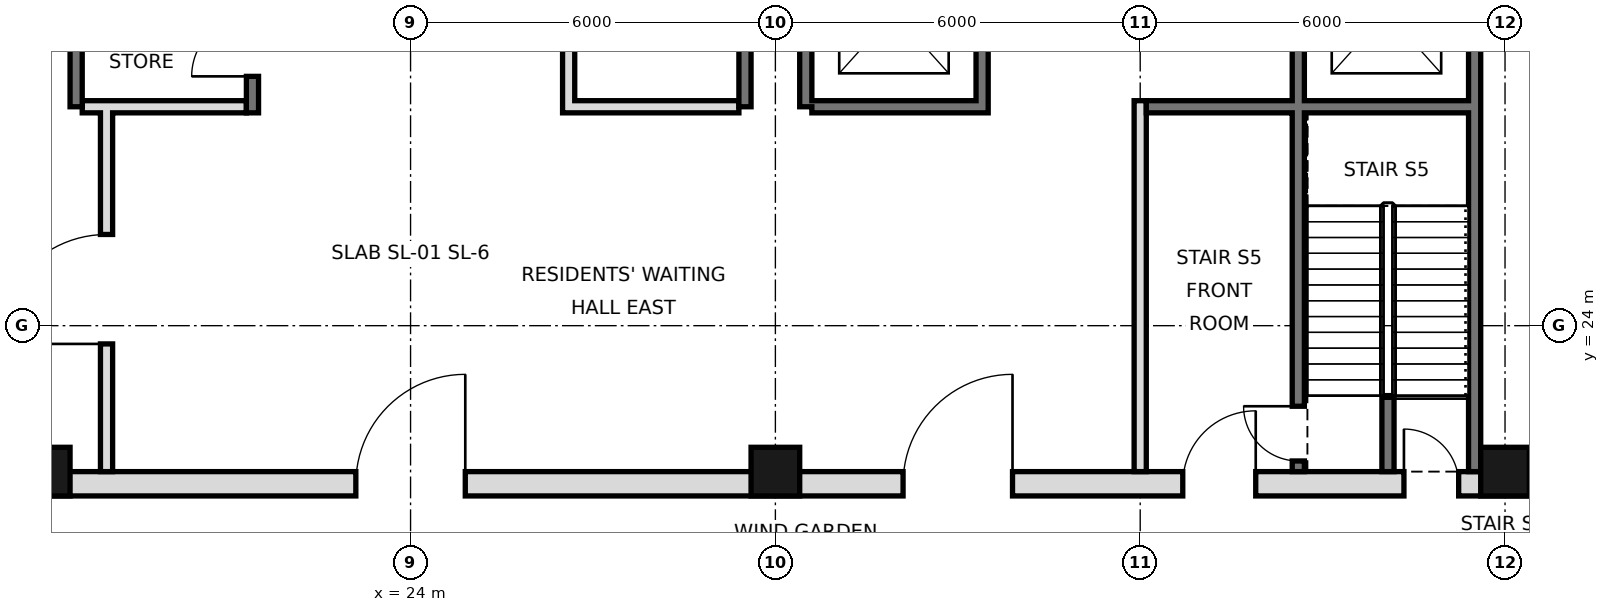
"""IFC4 building model, lengths in metres.
Left out: names, types, materials, properties, quantities, classifications, styles, units other than length and angle.
Written with IfcOpenShell. Run it as: python <this file> out.ifc"""

import sys

from ifc_helpers import new_model, si_unit, direction, frame, frame_2d, origin, origin_2d, place, context, subcontext, project, spatial, rectangle, hollow_rectangle, extrude, element, fill, save


model = new_model("IFC4")
c1 = context("Model", 3, precision=1e-05, world=origin(), true_north=direction((0.0, 1.0)))
c2 = subcontext(c1, "Body", "Model", "MODEL_VIEW")
j1 = project(units=[si_unit("LENGTHUNIT", "METRE"), si_unit("PLANEANGLEUNIT", "RADIAN")], contexts=[c1])
p1 = place(None, origin())
s1 = spatial("IfcSite", under=j1, at=p1, CompositionType="ELEMENT")
p2 = place(p1, origin())
s2 = spatial("IfcBuilding", under=s1, at=p2, CompositionType="ELEMENT")
p3 = place(p2, frame((0.0, 0.0, 281.8)))
s3 = spatial("IfcBuildingStorey", under=s2, at=p3, CompositionType="ELEMENT", Elevation=281.8)
for number, where, z_axis, x_axis in (
    (1, (18.0, 21.6, 0.0), (0.0, 0.0, 1.0), (1.0, 0.0, 0.0)),
    (2, (30.0, 21.6, 0.0), (0.0, 0.0, 1.0), (1.0, 0.0, 0.0)),
    (3, (42.0, 21.6, 0.0), (0.0, 0.0, 1.0), (1.0, 0.0, 0.0)),
):
    element("IfcColumn", number, at=place(p3, frame(where, z_axis=z_axis, x_axis=x_axis)), inside=s3, PredefinedType="COLUMN", context=c2, shape_type="SweptSolid", body=[
        extrude(hollow_rectangle(XDim=0.8, YDim=0.8, WallThickness=0.032, at=origin_2d()), origin(), (0.0, 0.0, 1.0), 9.0),
    ])
p4 = place(p3, frame((41.5, 21.6, 0.0), z_axis=(0.0, 0.0, 1.0), x_axis=(0.0, 1.0, 0.0)))
e4 = element("IfcWall", 4, at=p4, inside=s3, PredefinedType="SOLIDWALL", context=c2, shape_type="SweptSolid", body=[
    extrude(rectangle(XDim=23.5, YDim=0.2, at=frame_2d((11.75, 0.0))), origin(), (0.0, 0.0, 1.0), 8.7),
])
for number, where, z_axis, x_axis in (
    (5, (18.5, 27.6, 0.0), (0.0, 0.0, 1.0), (0.0, 1.0, 0.0)),
    (6, (29.5, 27.6, 0.0), (0.0, 0.0, 1.0), (0.0, 1.0, 0.0)),
    (7, (30.5, 27.6, 0.0), (0.0, 0.0, 1.0), (0.0, 1.0, 0.0)),
):
    element("IfcWall", number, at=place(p3, frame(where, z_axis=z_axis, x_axis=x_axis)), inside=s3, PredefinedType="SOLIDWALL", context=c2, shape_type="SweptSolid", body=[
        extrude(rectangle(XDim=17.5, YDim=0.2, at=frame_2d((8.75, 0.0))), origin(), (0.0, 0.0, 1.0), 8.7),
    ])
p5 = place(p3, frame((5.6, 21.4, 0.0), z_axis=(0.0, 0.0, 1.0), x_axis=(1.0, 0.0, 0.0)))
e8 = element("IfcWall", 8, at=p5, inside=s3, PredefinedType="SOLIDWALL", context=c2, shape_type="SweptSolid", body=[
    extrude(rectangle(XDim=36.8, YDim=0.4, at=frame_2d((18.4, 0.0))), origin(), (0.0, 0.0, 1.0), 8.7),
])
p6 = place(p5, frame((8.5, 0.0, 0.0)))
e9 = element("IfcOpeningElement", 9, at=p6, cuts=e8, PredefinedType="OPENING", context=c2, shape_type="SweptSolid", body=[
    extrude(rectangle(XDim=1.8, YDim=2.1, at=frame_2d((0.9, 1.05))), frame((0.0, 0.21, 0.0), z_axis=(0.0, -1.0, 0.0), x_axis=(1.0, 0.0, 0.0)), (0.0, 0.0, 1.0), 0.42),
])
p7 = place(p5, frame((17.5, 0.0, 0.0)))
e10 = element("IfcOpeningElement", 10, at=p7, cuts=e8, PredefinedType="OPENING", context=c2, shape_type="SweptSolid", body=[
    extrude(rectangle(XDim=1.8, YDim=2.1, at=frame_2d((0.9, 1.05))), frame((0.0, 0.21, 0.0), z_axis=(0.0, -1.0, 0.0), x_axis=(1.0, 0.0, 0.0)), (0.0, 0.0, 1.0), 0.42),
])
p8 = place(p5, frame((26.5, 0.0, 0.0)))
e11 = element("IfcOpeningElement", 11, at=p8, cuts=e8, PredefinedType="OPENING", context=c2, shape_type="SweptSolid", body=[
    extrude(rectangle(XDim=1.8, YDim=2.1, at=frame_2d((0.9, 1.05))), frame((0.0, 0.21, 0.0), z_axis=(0.0, -1.0, 0.0), x_axis=(1.0, 0.0, 0.0)), (0.0, 0.0, 1.0), 0.42),
])
p9 = place(p5, frame((4.5, 0.0, 0.0)))
e12 = element("IfcOpeningElement", 12, at=p9, cuts=e8, PredefinedType="OPENING", context=c2, shape_type="SweptSolid", body=[
    extrude(rectangle(XDim=1.2, YDim=2.1, at=frame_2d((0.6, 1.05))), frame((0.0, 0.21, 0.0), z_axis=(0.0, -1.0, 0.0), x_axis=(1.0, 0.0, 0.0)), (0.0, 0.0, 1.0), 0.42),
])
p10 = place(p5, frame((31.1, 0.0, 0.0)))
e13 = element("IfcOpeningElement", 13, at=p10, cuts=e8, PredefinedType="OPENING", context=c2, shape_type="SweptSolid", body=[
    extrude(rectangle(XDim=1.2, YDim=2.1, at=frame_2d((0.6, 1.05))), frame((0.0, 0.21, 0.0), z_axis=(0.0, -1.0, 0.0), x_axis=(1.0, 0.0, 0.0)), (0.0, 0.0, 1.0), 0.42),
])
p11 = place(p5, frame((1.163, 0.0, 0.0)))
e14 = element("IfcOpeningElement", 14, at=p11, cuts=e8, PredefinedType="OPENING", context=c2, shape_type="SweptSolid", body=[
    extrude(rectangle(XDim=0.9, YDim=2.1, at=frame_2d((0.45, 1.05))), frame((0.0, 0.21, 0.0), z_axis=(0.0, -1.0, 0.0), x_axis=(1.0, 0.0, 0.0)), (0.0, 0.0, 1.0), 0.42),
])
p12 = place(p5, frame((34.738, 0.0, 0.0)))
e15 = element("IfcOpeningElement", 15, at=p12, cuts=e8, PredefinedType="OPENING", context=c2, shape_type="SweptSolid", body=[
    extrude(rectangle(XDim=0.9, YDim=2.1, at=frame_2d((0.45, 1.05))), frame((0.0, 0.21, 0.0), z_axis=(0.0, -1.0, 0.0), x_axis=(1.0, 0.0, 0.0)), (0.0, 0.0, 1.0), 0.42),
])
p13 = place(p3, frame((19.0, 21.6, 0.0), z_axis=(0.0, 0.0, 1.0), x_axis=(0.0, 1.0, 0.0)))
e16 = element("IfcWall", 16, at=p13, inside=s3, PredefinedType="PARTITIONING", context=c2, shape_type="SweptSolid", body=[
    extrude(rectangle(XDim=6.0, YDim=0.2, at=frame_2d((3.0, 0.0))), origin(), (0.0, 0.0, 1.0), 8.7),
])
p14 = place(p13, frame((2.1, 0.0, 0.0)))
e17 = element("IfcOpeningElement", 17, at=p14, cuts=e16, PredefinedType="OPENING", context=c2, shape_type="SweptSolid", body=[
    extrude(rectangle(XDim=1.8, YDim=2.1, at=frame_2d((0.9, 1.05))), frame((0.0, 0.11, 0.0), z_axis=(0.0, -1.0, 0.0), x_axis=(1.0, 0.0, 0.0)), (0.0, 0.0, 1.0), 0.22),
])
p15 = place(p3, frame((21.4, 27.5, 0.0), z_axis=(0.0, 0.0, 1.0), x_axis=(0.0, 1.0, 0.0)))
e18 = element("IfcWall", 18, at=p15, inside=s3, PredefinedType="SOLIDWALL", context=c2, shape_type="SweptSolid", body=[
    extrude(rectangle(XDim=17.5, YDim=0.2, at=frame_2d((8.75, 0.0))), origin(), (0.0, 0.0, 1.0), 8.7),
])
p16 = place(p15, frame((0.6, 0.0, 0.0)))
e19 = element("IfcOpeningElement", 19, at=p16, cuts=e18, PredefinedType="OPENING", context=c2, shape_type="SweptSolid", body=[
    extrude(rectangle(XDim=1.0, YDim=2.1, at=frame_2d((0.5, 1.05))), frame((0.0, 0.11, 0.0), z_axis=(0.0, -1.0, 0.0), x_axis=(1.0, 0.0, 0.0)), (0.0, 0.0, 1.0), 0.22),
])
p17 = place(p15, frame((3.7, 0.0, 0.0)))
e20 = element("IfcOpeningElement", 20, at=p17, cuts=e18, PredefinedType="OPENING", context=c2, shape_type="SweptSolid", body=[
    extrude(rectangle(XDim=1.0, YDim=2.1, at=frame_2d((0.5, 1.05))), frame((0.0, 0.11, 0.0), z_axis=(0.0, -1.0, 0.0), x_axis=(1.0, 0.0, 0.0)), (0.0, 0.0, 1.0), 0.22),
])
p18 = place(p15, frame((9.8, 0.0, 0.0)))
e21 = element("IfcOpeningElement", 21, at=p18, cuts=e18, PredefinedType="OPENING", context=c2, shape_type="SweptSolid", body=[
    extrude(rectangle(XDim=1.0, YDim=2.1, at=frame_2d((0.5, 1.05))), frame((0.0, 0.11, 0.0), z_axis=(0.0, -1.0, 0.0), x_axis=(1.0, 0.0, 0.0)), (0.0, 0.0, 1.0), 0.22),
])
p19 = place(p15, frame((16.2, 0.0, 0.0)))
e22 = element("IfcOpeningElement", 22, at=p19, cuts=e18, PredefinedType="OPENING", context=c2, shape_type="SweptSolid", body=[
    extrude(rectangle(XDim=1.0, YDim=2.1, at=frame_2d((0.5, 1.05))), frame((0.0, 0.11, 0.0), z_axis=(0.0, -1.0, 0.0), x_axis=(1.0, 0.0, 0.0)), (0.0, 0.0, 1.0), 0.22),
])
p20 = place(p15, frame((7.4, 0.0, 0.0)))
e23 = element("IfcOpeningElement", 23, at=p20, cuts=e18, PredefinedType="OPENING", context=c2, shape_type="SweptSolid", body=[
    extrude(rectangle(XDim=0.9, YDim=2.1, at=frame_2d((0.45, 1.05))), frame((0.0, 0.11, 0.0), z_axis=(0.0, -1.0, 0.0), x_axis=(1.0, 0.0, 0.0)), (0.0, 0.0, 1.0), 0.22),
])
p21 = place(p3, frame((26.6, 27.5, 0.0), z_axis=(0.0, 0.0, 1.0), x_axis=(0.0, 1.0, 0.0)))
e24 = element("IfcWall", 24, at=p21, inside=s3, PredefinedType="SOLIDWALL", context=c2, shape_type="SweptSolid", body=[
    extrude(rectangle(XDim=17.5, YDim=0.2, at=frame_2d((8.75, 0.0))), origin(), (0.0, 0.0, 1.0), 8.7),
])
p22 = place(p21, frame((4.3, 0.0, 0.0)))
e25 = element("IfcOpeningElement", 25, at=p22, cuts=e24, PredefinedType="OPENING", context=c2, shape_type="SweptSolid", body=[
    extrude(rectangle(XDim=0.9, YDim=2.1, at=frame_2d((0.45, 1.05))), frame((0.0, 0.11, 0.0), z_axis=(0.0, -1.0, 0.0), x_axis=(1.0, 0.0, 0.0)), (0.0, 0.0, 1.0), 0.22),
])
p23 = place(p21, frame((10.35, 0.0, 0.0)))
e26 = element("IfcOpeningElement", 26, at=p23, cuts=e24, PredefinedType="OPENING", context=c2, shape_type="SweptSolid", body=[
    extrude(rectangle(XDim=1.0, YDim=2.1, at=frame_2d((0.5, 1.05))), frame((0.0, 0.11, 0.0), z_axis=(0.0, -1.0, 0.0), x_axis=(1.0, 0.0, 0.0)), (0.0, 0.0, 1.0), 0.22),
])
p24 = place(p3, frame((33.4, 27.5, 0.0), z_axis=(0.0, 0.0, 1.0), x_axis=(0.0, 1.0, 0.0)))
e27 = element("IfcWall", 27, at=p24, inside=s3, PredefinedType="SOLIDWALL", context=c2, shape_type="SweptSolid", body=[
    extrude(rectangle(XDim=17.5, YDim=0.2, at=frame_2d((8.75, 0.0))), origin(), (0.0, 0.0, 1.0), 8.7),
])
p25 = place(p24, frame((1.1, 0.0, 0.0)))
e28 = element("IfcOpeningElement", 28, at=p25, cuts=e27, PredefinedType="OPENING", context=c2, shape_type="SweptSolid", body=[
    extrude(rectangle(XDim=1.1, YDim=2.1, at=frame_2d((0.55, 1.05))), frame((0.0, 0.11, 0.0), z_axis=(0.0, -1.0, 0.0), x_axis=(1.0, 0.0, 0.0)), (0.0, 0.0, 1.0), 0.22),
])
p26 = place(p24, frame((4.2, 0.0, 0.0)))
e29 = element("IfcOpeningElement", 29, at=p26, cuts=e27, PredefinedType="OPENING", context=c2, shape_type="SweptSolid", body=[
    extrude(rectangle(XDim=1.1, YDim=2.1, at=frame_2d((0.55, 1.05))), frame((0.0, 0.11, 0.0), z_axis=(0.0, -1.0, 0.0), x_axis=(1.0, 0.0, 0.0)), (0.0, 0.0, 1.0), 0.22),
])
p27 = place(p24, frame((15.4, 0.0, 0.0)))
e30 = element("IfcOpeningElement", 30, at=p27, cuts=e27, PredefinedType="OPENING", context=c2, shape_type="SweptSolid", body=[
    extrude(rectangle(XDim=1.1, YDim=2.1, at=frame_2d((0.55, 1.05))), frame((0.0, 0.11, 0.0), z_axis=(0.0, -1.0, 0.0), x_axis=(1.0, 0.0, 0.0)), (0.0, 0.0, 1.0), 0.22),
])
p28 = place(p24, frame((9.9, 0.0, 0.0)))
e31 = element("IfcOpeningElement", 31, at=p28, cuts=e27, PredefinedType="OPENING", context=c2, shape_type="SweptSolid", body=[
    extrude(rectangle(XDim=0.9, YDim=2.1, at=frame_2d((0.45, 1.05))), frame((0.0, 0.11, 0.0), z_axis=(0.0, -1.0, 0.0), x_axis=(1.0, 0.0, 0.0)), (0.0, 0.0, 1.0), 0.22),
])
p29 = place(p3, frame((36.0, 21.6, 0.0), z_axis=(0.0, 0.0, 1.0), x_axis=(0.0, 1.0, 0.0)))
e32 = element("IfcWall", 32, at=p29, inside=s3, PredefinedType="PARTITIONING", context=c2, shape_type="SweptSolid", body=[
    extrude(rectangle(XDim=6.1, YDim=0.2, at=frame_2d((3.05, 0.0))), origin(), (0.0, 0.0, 1.0), 8.7),
])
p30 = place(p3, frame((38.6, 21.6, 0.0), z_axis=(0.0, 0.0, 1.0), x_axis=(0.0, 1.0, 0.0)))
e33 = element("IfcWall", 33, at=p30, inside=s3, PredefinedType="SOLIDWALL", context=c2, shape_type="SweptSolid", body=[
    extrude(rectangle(XDim=23.4, YDim=0.2, at=frame_2d((11.7, 0.0))), origin(), (0.0, 0.0, 1.0), 8.7),
])
p31 = place(p30, frame((7.0, 0.0, 0.0)))
e34 = element("IfcOpeningElement", 34, at=p31, cuts=e33, PredefinedType="OPENING", context=c2, shape_type="SweptSolid", body=[
    extrude(rectangle(XDim=1.1, YDim=2.1, at=frame_2d((0.55, 1.05))), frame((0.0, 0.11, 0.0), z_axis=(0.0, -1.0, 0.0), x_axis=(1.0, 0.0, 0.0)), (0.0, 0.0, 1.0), 0.22),
])
p32 = place(p30, frame((10.1, 0.0, 0.0)))
e35 = element("IfcOpeningElement", 35, at=p32, cuts=e33, PredefinedType="OPENING", context=c2, shape_type="SweptSolid", body=[
    extrude(rectangle(XDim=1.1, YDim=2.1, at=frame_2d((0.55, 1.05))), frame((0.0, 0.11, 0.0), z_axis=(0.0, -1.0, 0.0), x_axis=(1.0, 0.0, 0.0)), (0.0, 0.0, 1.0), 0.22),
])
p33 = place(p30, frame((13.2, 0.0, 0.0)))
e36 = element("IfcOpeningElement", 36, at=p33, cuts=e33, PredefinedType="OPENING", context=c2, shape_type="SweptSolid", body=[
    extrude(rectangle(XDim=1.1, YDim=2.1, at=frame_2d((0.55, 1.05))), frame((0.0, 0.11, 0.0), z_axis=(0.0, -1.0, 0.0), x_axis=(1.0, 0.0, 0.0)), (0.0, 0.0, 1.0), 0.22),
])
p34 = place(p30, frame((15.7, 0.0, 0.0)))
e37 = element("IfcOpeningElement", 37, at=p34, cuts=e33, PredefinedType="OPENING", context=c2, shape_type="SweptSolid", body=[
    extrude(rectangle(XDim=1.0, YDim=2.1, at=frame_2d((0.5, 1.05))), frame((0.0, 0.11, 0.0), z_axis=(0.0, -1.0, 0.0), x_axis=(1.0, 0.0, 0.0)), (0.0, 0.0, 1.0), 0.22),
])
p35 = place(p30, frame((22.1, 0.0, 0.0)))
e38 = element("IfcOpeningElement", 38, at=p35, cuts=e33, PredefinedType="OPENING", context=c2, shape_type="SweptSolid", body=[
    extrude(rectangle(XDim=1.0, YDim=2.1, at=frame_2d((0.5, 1.05))), frame((0.0, 0.11, 0.0), z_axis=(0.0, -1.0, 0.0), x_axis=(1.0, 0.0, 0.0)), (0.0, 0.0, 1.0), 0.22),
])
p36 = place(p30, frame((0.175, 0.0, 0.0)))
e39 = element("IfcOpeningElement", 39, at=p36, cuts=e33, PredefinedType="OPENING", context=c2, shape_type="SweptSolid", body=[
    extrude(rectangle(XDim=0.9, YDim=2.1, at=frame_2d((0.45, 1.05))), frame((0.0, 0.11, 0.0), z_axis=(0.0, -1.0, 0.0), x_axis=(1.0, 0.0, 0.0)), (0.0, 0.0, 1.0), 0.22),
])
p37 = place(p3, frame((40.075, 21.6, 0.0), z_axis=(0.0, 0.0, 1.0), x_axis=(0.0, 1.0, 0.0)))
e40 = element("IfcWall", 40, at=p37, inside=s3, PredefinedType="SOLIDWALL", context=c2, shape_type="SweptSolid", body=[
    extrude(rectangle(XDim=1.25, YDim=0.2, at=frame_2d((0.625, 0.0))), origin(), (0.0, 0.0, 1.0), 8.7),
])
p38 = place(p3, frame((18.6, 27.6, 0.0), z_axis=(0.0, 0.0, 1.0), x_axis=(1.0, 0.0, 0.0)))
e41 = element("IfcWall", 41, at=p38, inside=s3, PredefinedType="PARTITIONING", context=c2, shape_type="SweptSolid", body=[
    extrude(rectangle(XDim=2.7, YDim=0.2, at=frame_2d((1.35, 0.0))), origin(), (0.0, 0.0, 1.0), 8.7),
])
for number, where, z_axis, x_axis in (
    (42, (26.7, 27.6, 0.0), (0.0, 0.0, 1.0), (1.0, 0.0, 0.0)),
    (43, (30.6, 27.6, 0.0), (0.0, 0.0, 1.0), (1.0, 0.0, 0.0)),
):
    element("IfcWall", number, at=place(p3, frame(where, z_axis=z_axis, x_axis=x_axis)), inside=s3, PredefinedType="SOLIDWALL", context=c2, shape_type="SweptSolid", body=[
        extrude(rectangle(XDim=2.7, YDim=0.2, at=frame_2d((1.35, 0.0))), origin(), (0.0, 0.0, 1.0), 8.7),
    ])
p39 = place(p3, frame((36.1, 27.6, 0.0), z_axis=(0.0, 0.0, 1.0), x_axis=(1.0, 0.0, 0.0)))
e44 = element("IfcWall", 44, at=p39, inside=s3, PredefinedType="SOLIDWALL", context=c2, shape_type="SweptSolid", body=[
    extrude(rectangle(XDim=5.3, YDim=0.2, at=frame_2d((2.65, 0.0))), origin(), (0.0, 0.0, 1.0), 8.7),
])
p40 = place(p14, origin())
e45 = element("IfcDoor", 45, at=p40, inside=s3, OperationType="SINGLE_SWING_LEFT", PredefinedType="DOOR", context=c2, shape_type="SweptSolid", body=[
    extrude(rectangle(XDim=1.8, YDim=2.1, at=frame_2d((0.9, 1.05))), frame((0.0, 0.025, 0.0), z_axis=(0.0, -1.0, 0.0), x_axis=(1.0, 0.0, 0.0)), (0.0, 0.0, 1.0), 0.05),
])
fill(e17, e45)
p41 = place(p7, frame((1.8, 0.0, 0.0), z_axis=(0.0, 0.0, 1.0), x_axis=(-1.0, 0.0, 0.0)))
e46 = element("IfcDoor", 46, at=p41, inside=s3, OperationType="SINGLE_SWING_LEFT", PredefinedType="DOOR", context=c2, shape_type="SweptSolid", body=[
    extrude(rectangle(XDim=1.8, YDim=2.1, at=frame_2d((0.9, 1.05))), frame((0.0, 0.025, 0.0), z_axis=(0.0, -1.0, 0.0), x_axis=(1.0, 0.0, 0.0)), (0.0, 0.0, 1.0), 0.05),
])
fill(e10, e46)
p42 = place(p8, frame((1.8, 0.0, 0.0), z_axis=(0.0, 0.0, 1.0), x_axis=(-1.0, 0.0, 0.0)))
e47 = element("IfcDoor", 47, at=p42, inside=s3, OperationType="SINGLE_SWING_LEFT", PredefinedType="DOOR", context=c2, shape_type="SweptSolid", body=[
    extrude(rectangle(XDim=1.8, YDim=2.1, at=frame_2d((0.9, 1.05))), frame((0.0, 0.025, 0.0), z_axis=(0.0, -1.0, 0.0), x_axis=(1.0, 0.0, 0.0)), (0.0, 0.0, 1.0), 0.05),
])
fill(e11, e47)
p43 = place(p10, frame((1.2, 0.0, 0.0), z_axis=(0.0, 0.0, 1.0), x_axis=(-1.0, 0.0, 0.0)))
e48 = element("IfcDoor", 48, at=p43, inside=s3, OperationType="SINGLE_SWING_LEFT", PredefinedType="DOOR", context=c2, shape_type="SweptSolid", body=[
    extrude(rectangle(XDim=1.2, YDim=2.1, at=frame_2d((0.6, 1.05))), frame((0.0, 0.025, 0.0), z_axis=(0.0, -1.0, 0.0), x_axis=(1.0, 0.0, 0.0)), (0.0, 0.0, 1.0), 0.05),
])
fill(e13, e48)
p44 = place(p16, origin())
e49 = element("IfcDoor", 49, at=p44, inside=s3, OperationType="SINGLE_SWING_LEFT", PredefinedType="DOOR", context=c2, shape_type="SweptSolid", body=[
    extrude(rectangle(XDim=1.0, YDim=2.1, at=frame_2d((0.5, 1.05))), frame((0.0, 0.025, 0.0), z_axis=(0.0, -1.0, 0.0), x_axis=(1.0, 0.0, 0.0)), (0.0, 0.0, 1.0), 0.05),
])
fill(e19, e49)
p45 = place(p36, frame((0.9, 0.0, 0.0), z_axis=(0.0, 0.0, 1.0), x_axis=(-1.0, 0.0, 0.0)))
e50 = element("IfcDoor", 50, at=p45, inside=s3, OperationType="SINGLE_SWING_LEFT", PredefinedType="DOOR", context=c2, shape_type="SweptSolid", body=[
    extrude(rectangle(XDim=0.9, YDim=2.1, at=frame_2d((0.45, 1.05))), frame((0.0, 0.025, 0.0), z_axis=(0.0, -1.0, 0.0), x_axis=(1.0, 0.0, 0.0)), (0.0, 0.0, 1.0), 0.05),
])
fill(e39, e50)
p46 = place(p12, origin())
e51 = element("IfcDoor", 51, at=p46, inside=s3, OperationType="SINGLE_SWING_LEFT", PredefinedType="DOOR", context=c2, shape_type="SweptSolid", body=[
    extrude(rectangle(XDim=0.9, YDim=2.1, at=frame_2d((0.45, 1.05))), frame((0.0, 0.025, 0.0), z_axis=(0.0, -1.0, 0.0), x_axis=(1.0, 0.0, 0.0)), (0.0, 0.0, 1.0), 0.05),
])
fill(e15, e51)
save(model, sys.argv[1])
